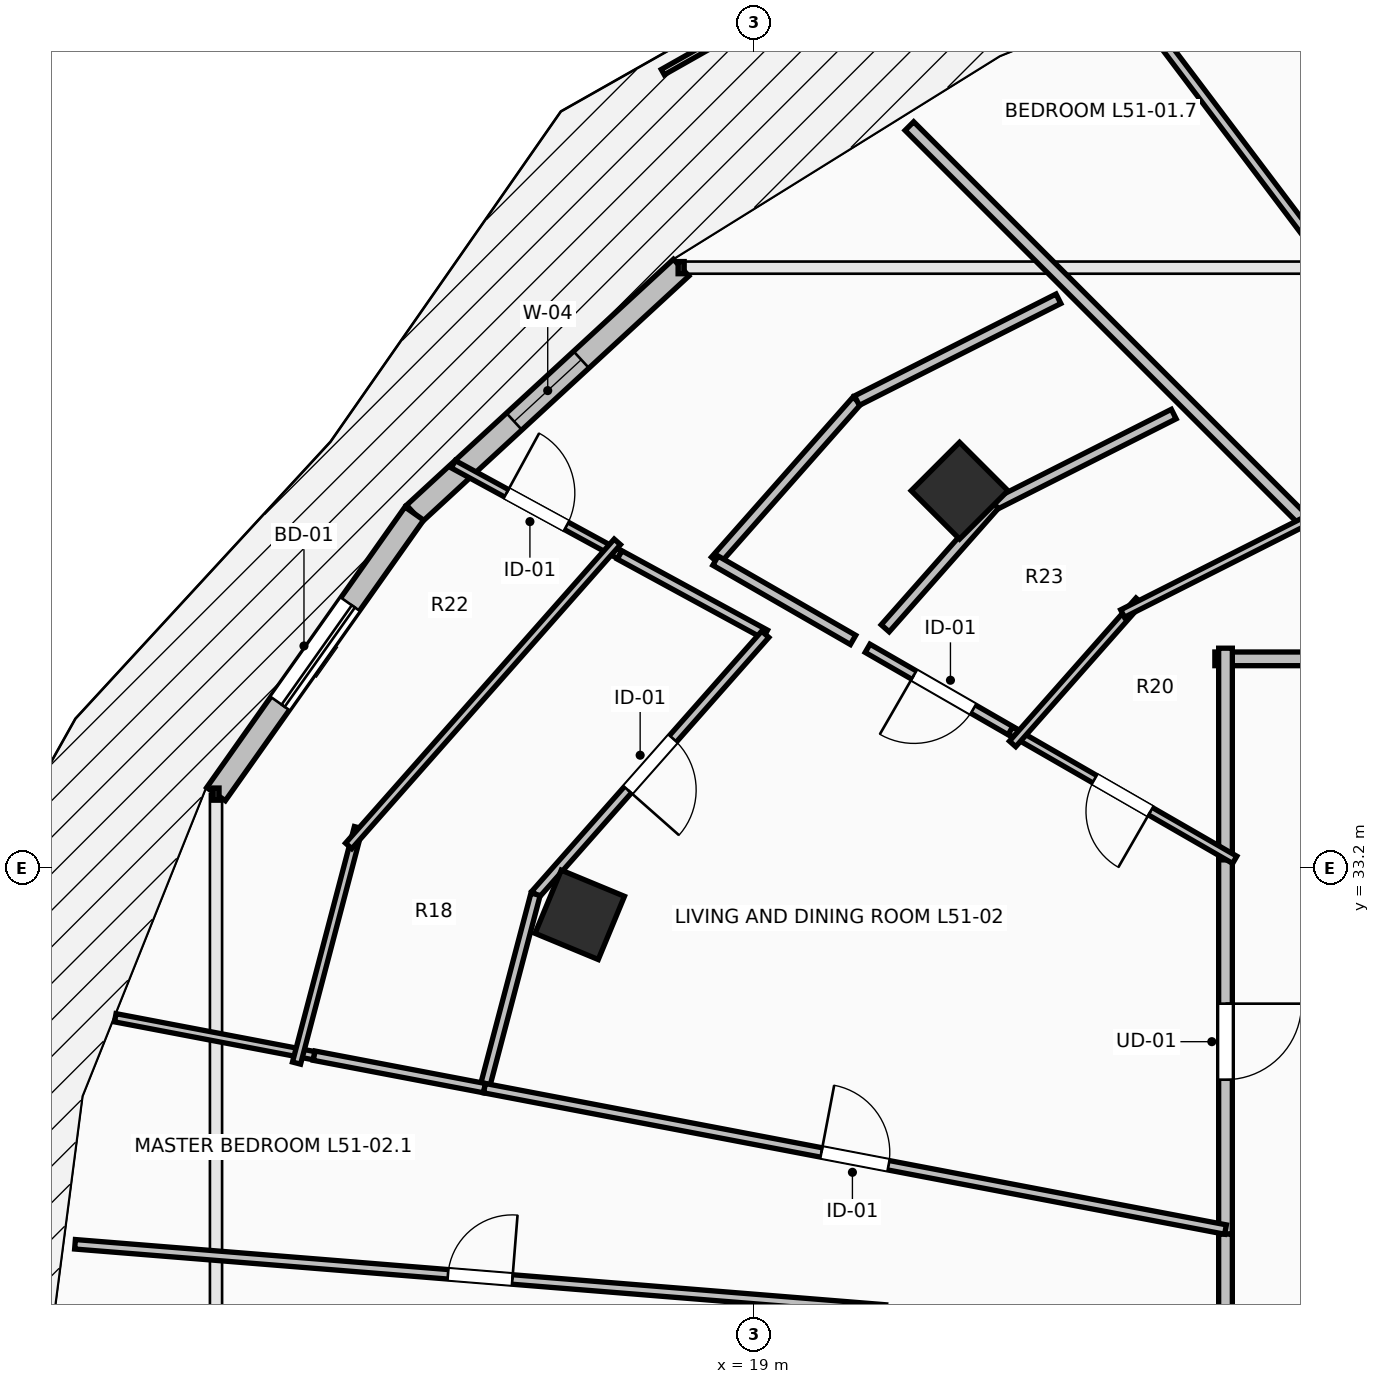
"""IFC4 building model, lengths in metres.
Left out: names, types, materials, properties, quantities, classifications, styles, units other than length and angle.
Written with IfcOpenShell. Run it as: python <this file> out.ifc"""

import sys

from ifc_helpers import new_model, si_unit, direction, frame, frame_2d, origin, origin_2d, place, context, subcontext, project, spatial, rectangle, extrude, element, fill, save


model = new_model("IFC4")
c1 = context("Model", 3, precision=1e-05, world=origin(), true_north=direction((0.0, 1.0)))
c2 = subcontext(c1, "Body", "Model", "MODEL_VIEW")
j1 = project(units=[si_unit("LENGTHUNIT", "METRE"), si_unit("PLANEANGLEUNIT", "RADIAN")], contexts=[c1])
p1 = place(None, origin())
s1 = spatial("IfcSite", under=j1, at=p1, CompositionType="ELEMENT")
p2 = place(p1, origin())
s2 = spatial("IfcBuilding", under=s1, at=p2, CompositionType="ELEMENT")
p3 = place(p2, frame((0.0, 0.0, 189.6)))
s3 = spatial("IfcBuildingStorey", under=s2, at=p3, CompositionType="ELEMENT", Elevation=189.6)
for number, where, z_axis, x_axis in (
    (1, (21.701, 38.162, 0.0), (0.0, 0.0, 1.0), (-0.707, 0.707, 0.0)),
    (2, (16.705, 32.582, 0.0), (0.0, 0.0, 1.0), (-0.924, 0.383, 0.0)),
):
    element("IfcColumn", number, at=place(p3, frame(where, z_axis=z_axis, x_axis=x_axis)), inside=s3, PredefinedType="COLUMN", context=c2, shape_type="SweptSolid", body=[
        extrude(rectangle(XDim=0.9, YDim=0.9, at=origin_2d()), origin(), (0.0, 0.0, 1.0), 3.5),
    ])
p4 = place(p3, frame((18.038, 41.097, 0.0), z_axis=(0.0, 0.0, 1.0), x_axis=(-0.735359993374, -0.677676678177, 0.0)))
e3 = element("IfcWall", 3, at=p4, inside=s3, PredefinedType="STANDARD", context=c2, shape_type="SweptSolid", body=[
    extrude(rectangle(XDim=4.774, YDim=0.3, at=frame_2d((2.387, 0.0))), origin(), (0.0, 0.0, 1.0), 3.24),
])
p5 = place(p4, frame((1.787, 0.0, 0.85)))
e4 = element("IfcOpeningElement", 4, at=p5, cuts=e3, PredefinedType="OPENING", context=c2, shape_type="SweptSolid", body=[
    extrude(rectangle(XDim=1.2, YDim=2.1, at=frame_2d((0.6, 1.05))), frame((0.0, 0.165, 0.0), z_axis=(0.0, -1.0, 0.0), x_axis=(1.0, 0.0, 0.0)), (0.0, 0.0, 1.0), 0.33),
])
p6 = place(p3, frame((14.528, 37.861, 0.0), z_axis=(0.0, 0.0, 1.0), x_axis=(-0.577168747264, -0.81662490605, 0.0)))
e5 = element("IfcWall", 5, at=p6, inside=s3, PredefinedType="STANDARD", context=c2, shape_type="SweptSolid", body=[
    extrude(rectangle(XDim=4.52, YDim=0.3, at=frame_2d((2.26, 0.0))), origin(), (0.0, 0.0, 1.0), 3.24),
])
p7 = place(p6, frame((1.46, 0.0, 0.0)))
e6 = element("IfcOpeningElement", 6, at=p7, cuts=e5, PredefinedType="OPENING", context=c2, shape_type="SweptSolid", body=[
    extrude(rectangle(XDim=1.6, YDim=2.3, at=frame_2d((0.8, 1.15))), frame((0.0, 0.165, 0.0), z_axis=(0.0, -1.0, 0.0), x_axis=(1.0, 0.0, 0.0)), (0.0, 0.0, 1.0), 0.33),
])
p8 = place(p3, frame((25.2, 33.445, 0.0), z_axis=(0.0, 0.0, 1.0), x_axis=(0.0, -1.0, 0.0)))
e7 = element("IfcWall", 7, at=p8, inside=s3, PredefinedType="PARTITIONING", context=c2, shape_type="SweptSolid", body=[
    extrude(rectangle(XDim=5.063, YDim=0.18, at=frame_2d((2.531, 0.0))), origin(), (0.0, 0.0, 1.0), 2.432),
])
p9 = place(p8, frame((2.031, 0.0, 0.0)))
e8 = element("IfcOpeningElement", 8, at=p9, cuts=e7, PredefinedType="OPENING", context=c2, shape_type="SweptSolid", body=[
    extrude(rectangle(XDim=1.0, YDim=2.15, at=frame_2d((0.5, 1.075))), frame((0.0, 0.105, 0.0), z_axis=(0.0, -1.0, 0.0), x_axis=(1.0, 0.0, 0.0)), (0.0, 0.0, 1.0), 0.21),
])
p10 = place(p3, frame((28.105, 35.95, 0.0), z_axis=(0.0, 0.0, 1.0), x_axis=(-1.0, 0.0, 0.0)))
e9 = element("IfcWall", 9, at=p10, inside=s3, PredefinedType="PARTITIONING", context=c2, shape_type="SweptSolid", body=[
    extrude(rectangle(XDim=3.045, YDim=0.18, at=frame_2d((1.522, 0.0))), origin(), (0.0, 0.0, 1.0), 2.432),
])
p11 = place(p3, frame((25.2, 36.09, 0.0), z_axis=(0.0, 0.0, 1.0), x_axis=(0.0, -1.0, 0.0)))
e10 = element("IfcWall", 10, at=p11, inside=s3, PredefinedType="PARTITIONING", context=c2, shape_type="SweptSolid", body=[
    extrude(rectangle(XDim=2.785, YDim=0.18, at=frame_2d((1.393, 0.0))), origin(), (0.0, 0.0, 1.0), 2.432),
])
p12 = place(p3, frame((25.2, 28.382, 0.0), z_axis=(0.0, 0.0, 1.0), x_axis=(0.0, -1.0, 0.0)))
e11 = element("IfcWall", 11, at=p12, inside=s3, PredefinedType="PARTITIONING", context=c2, shape_type="SweptSolid", body=[
    extrude(rectangle(XDim=1.132, YDim=0.18, at=frame_2d((0.566, 0.0))), origin(), (0.0, 0.0, 1.0), 2.432),
])
p13 = place(p3, frame((24.075, 44.46, 0.0), z_axis=(0.0, 0.0, 1.0), x_axis=(0.602185523072, -0.798356183544, 0.0)))
e12 = element("IfcWall", 12, at=p13, inside=s3, PredefinedType="PARTITIONING", context=c2, shape_type="SweptSolid", body=[
    extrude(rectangle(XDim=10.659, YDim=0.125, at=frame_2d((5.33, 0.0))), origin(), (0.0, 0.0, 1.0), 2.432),
])
p14 = place(p3, frame((21.041, 42.959, 0.0), z_axis=(0.0, 0.0, 1.0), x_axis=(0.707106781187, -0.707106781187, 0.0)))
e13 = element("IfcWall", 13, at=p14, inside=s3, PredefinedType="PARTITIONING", context=c2, shape_type="SweptSolid", body=[
    extrude(rectangle(XDim=9.912, YDim=0.16, at=frame_2d((4.956, 0.0))), origin(), (0.0, 0.0, 1.0), 2.432),
])
p15 = place(p3, frame((22.492, 34.936, 0.0), z_axis=(0.0, 0.0, 1.0), x_axis=(-0.866435390844, 0.499289208267, 0.0)))
e14 = element("IfcWall", 14, at=p15, inside=s3, PredefinedType="PARTITIONING", context=c2, shape_type="SweptSolid", body=[
    extrude(rectangle(XDim=2.309, YDim=0.125, at=frame_2d((1.155, 0.0))), origin(), (0.0, 0.0, 1.0), 2.922),
])
p16 = place(p15, frame((0.705, 0.0, 0.0)))
e15 = element("IfcOpeningElement", 15, at=p16, cuts=e14, PredefinedType="OPENING", context=c2, shape_type="SweptSolid", body=[
    extrude(rectangle(XDim=0.9, YDim=2.1, at=frame_2d((0.45, 1.05))), frame((0.0, 0.077, 0.0), z_axis=(0.0, -1.0, 0.0), x_axis=(1.0, 0.0, 0.0)), (0.0, 0.0, 1.0), 0.155),
])
p17 = place(p3, frame((25.321, 33.306, 0.0), z_axis=(0.0, 0.0, 1.0), x_axis=(-0.866517217622, 0.49914718427, 0.0)))
e16 = element("IfcWall", 16, at=p17, inside=s3, PredefinedType="PARTITIONING", context=c2, shape_type="SweptSolid", body=[
    extrude(rectangle(XDim=3.405, YDim=0.11, at=frame_2d((1.703, 0.0))), origin(), (0.0, 0.0, 1.0), 2.922),
])
p18 = place(p17, frame((1.278, 0.0, 0.0)))
e17 = element("IfcOpeningElement", 17, at=p18, cuts=e16, PredefinedType="OPENING", context=c2, shape_type="SweptSolid", body=[
    extrude(rectangle(XDim=0.85, YDim=2.1, at=frame_2d((0.425, 1.05))), frame((0.0, 0.07, 0.0), z_axis=(0.0, -1.0, 0.0), x_axis=(1.0, 0.0, 0.0)), (0.0, 0.0, 1.0), 0.14),
])
p19 = place(p3, frame((15.041, 38.51, 0.0), z_axis=(0.0, 0.0, 1.0), x_axis=(0.877951724479, -0.478749171784, 0.0)))
e18 = element("IfcWall", 18, at=p19, inside=s3, PredefinedType="PARTITIONING", context=c2, shape_type="SweptSolid", body=[
    extrude(rectangle(XDim=2.492, YDim=0.11, at=frame_2d((1.246, 0.0))), origin(), (0.0, 0.0, 1.0), 3.24),
])
p20 = place(p19, frame((0.796, 0.0, 0.0)))
e19 = element("IfcOpeningElement", 19, at=p20, cuts=e18, PredefinedType="OPENING", context=c2, shape_type="SweptSolid", body=[
    extrude(rectangle(XDim=0.9, YDim=2.1, at=frame_2d((0.45, 1.05))), frame((0.0, 0.07, 0.0), z_axis=(0.0, -1.0, 0.0), x_axis=(1.0, 0.0, 0.0)), (0.0, 0.0, 1.0), 0.14),
])
p21 = place(p3, frame((13.21, 30.729, 0.0), z_axis=(0.0, 0.0, 1.0), x_axis=(-0.982266305937, 0.187491077708, 0.0)))
e20 = element("IfcWall", 20, at=p21, inside=s3, PredefinedType="PARTITIONING", context=c2, shape_type="SweptSolid", body=[
    extrude(rectangle(XDim=2.664, YDim=0.11, at=frame_2d((1.332, 0.0))), origin(), (0.0, 0.0, 1.0), 3.24),
])
p22 = place(p3, frame((17.229, 37.317, 0.0), z_axis=(0.0, 0.0, 1.0), x_axis=(0.878117834212, -0.47844442649, 0.0)))
e21 = element("IfcWall", 21, at=p22, inside=s3, PredefinedType="PARTITIONING", context=c2, shape_type="SweptSolid", body=[
    extrude(rectangle(XDim=2.182, YDim=0.125, at=frame_2d((1.091, 0.0))), origin(), (0.0, 0.0, 1.0), 3.24),
])
p23 = place(p3, frame((19.145, 36.273, 0.0), z_axis=(0.0, 0.0, 1.0), x_axis=(-0.662162868769, -0.749359950373, 0.0)))
e22 = element("IfcWall", 22, at=p23, inside=s3, PredefinedType="PARTITIONING", context=c2, shape_type="SweptSolid", body=[
    extrude(rectangle(XDim=4.564, YDim=0.125, at=frame_2d((2.282, 0.0))), origin(), (0.0, 0.0, 1.0), 3.24),
])
p24 = place(p23, frame((1.832, 0.0, 0.0)))
e23 = element("IfcOpeningElement", 23, at=p24, cuts=e22, PredefinedType="OPENING", context=c2, shape_type="SweptSolid", body=[
    extrude(rectangle(XDim=0.9, YDim=2.1, at=frame_2d((0.45, 1.05))), frame((0.0, 0.077, 0.0), z_axis=(0.0, -1.0, 0.0), x_axis=(1.0, 0.0, 0.0)), (0.0, 0.0, 1.0), 0.155),
])
p25 = place(p3, frame((16.123, 32.853, 0.0), z_axis=(0.0, 0.0, 1.0), x_axis=(-0.254775717765, -0.967000172512, 0.0)))
e24 = element("IfcWall", 24, at=p25, inside=s3, PredefinedType="PARTITIONING", context=c2, shape_type="SweptSolid", body=[
    extrude(rectangle(XDim=2.638, YDim=0.125, at=frame_2d((1.319, 0.0))), origin(), (0.0, 0.0, 1.0), 3.24),
])
p26 = place(p3, frame((15.451, 30.302, 0.0), z_axis=(0.0, 0.0, 1.0), x_axis=(-0.982295439063, 0.187338384738, 0.0)))
e25 = element("IfcWall", 25, at=p26, inside=s3, PredefinedType="PARTITIONING", context=c2, shape_type="SweptSolid", body=[
    extrude(rectangle(XDim=2.281, YDim=0.125, at=frame_2d((1.14, 0.0))), origin(), (0.0, 0.0, 1.0), 3.24),
])
p27 = place(p3, frame((15.451, 30.302, 0.0), z_axis=(0.0, 0.0, 1.0), x_axis=(0.982284698783, -0.187394691859, 0.0)))
e26 = element("IfcWall", 26, at=p27, inside=s3, PredefinedType="PARTITIONING", context=c2, shape_type="SweptSolid", body=[
    extrude(rectangle(XDim=9.925, YDim=0.125, at=frame_2d((4.962, 0.0))), origin(), (0.0, 0.0, 1.0), 2.774),
])
p28 = place(p27, frame((4.512, 0.0, 0.0)))
e27 = element("IfcOpeningElement", 27, at=p28, cuts=e26, PredefinedType="OPENING", context=c2, shape_type="SweptSolid", body=[
    extrude(rectangle(XDim=0.9, YDim=2.1, at=frame_2d((0.45, 1.05))), frame((0.0, 0.077, 0.0), z_axis=(0.0, -1.0, 0.0), x_axis=(1.0, 0.0, 0.0)), (0.0, 0.0, 1.0), 0.155),
])
p29 = place(p3, frame((22.399, 34.831, 0.0), z_axis=(0.0, 0.0, 1.0), x_axis=(0.662292938072, 0.749244996099, 0.0)))
e28 = element("IfcWall", 28, at=p29, inside=s3, PredefinedType="PARTITIONING", context=c2, shape_type="SweptSolid", body=[
    extrude(rectangle(XDim=2.513, YDim=0.11, at=frame_2d((1.256, 0.0))), origin(), (0.0, 0.0, 1.0), 2.432),
])
p30 = place(p3, frame((23.846, 36.546, 0.0), z_axis=(0.0, 0.0, 1.0), x_axis=(0.892553076465, 0.450942352959, 0.0)))
e29 = element("IfcWall", 29, at=p30, inside=s3, PredefinedType="PARTITIONING", context=c2, shape_type="SweptSolid", body=[
    extrude(rectangle(XDim=2.826, YDim=0.11, at=frame_2d((1.413, 0.0))), origin(), (0.0, 0.0, 1.0), 2.432),
])
p31 = place(p3, frame((12.979, 30.632, 0.0), z_axis=(0.0, 0.0, 1.0), x_axis=(0.254121849718, 0.967172210879, 0.0)))
e30 = element("IfcWall", 30, at=p31, inside=s3, PredefinedType="PARTITIONING", context=c2, shape_type="SweptSolid", body=[
    extrude(rectangle(XDim=3.203, YDim=0.11, at=frame_2d((1.602, 0.0))), origin(), (0.0, 0.0, 1.0), 3.24),
])
p32 = place(p3, frame((13.664, 33.489, 0.0), z_axis=(0.0, 0.0, 1.0), x_axis=(0.662149418065, 0.74937183571, 0.0)))
e31 = element("IfcWall", 31, at=p32, inside=s3, PredefinedType="PARTITIONING", context=c2, shape_type="SweptSolid", body=[
    extrude(rectangle(XDim=5.338, YDim=0.11, at=frame_2d((2.669, 0.0))), origin(), (0.0, 0.0, 1.0), 3.24),
])
p33 = place(p3, frame((10.064, 28.248, 0.0), z_axis=(0.0, 0.0, 1.0), x_axis=(0.996775744362, -0.080237867939, 0.0)))
e32 = element("IfcWall", 32, at=p33, inside=s3, PredefinedType="PARTITIONING", context=c2, shape_type="SweptSolid", body=[
    extrude(rectangle(XDim=10.695, YDim=0.125, at=frame_2d((5.348, 0.0))), origin(), (0.0, 0.0, 1.0), 2.774),
])
p34 = place(p33, frame((4.923, 0.0, 0.0)))
e33 = element("IfcOpeningElement", 33, at=p34, cuts=e32, PredefinedType="OPENING", context=c2, shape_type="SweptSolid", body=[
    extrude(rectangle(XDim=0.85, YDim=2.1, at=frame_2d((0.425, 1.05))), frame((0.0, 0.077, 0.0), z_axis=(0.0, -1.0, 0.0), x_axis=(1.0, 0.0, 0.0)), (0.0, 0.0, 1.0), 0.155),
])
p35 = place(p3, frame((18.49, 37.242, 0.0), z_axis=(0.0, 0.0, 1.0), x_axis=(0.662371376331, 0.749175653513, 0.0)))
e34 = element("IfcWall", 34, at=p35, inside=s3, PredefinedType="PARTITIONING", context=c2, shape_type="SweptSolid", body=[
    extrude(rectangle(XDim=2.81, YDim=0.14, at=frame_2d((1.405, 0.0))), origin(), (0.0, 0.0, 1.0), 3.24),
])
p36 = place(p3, frame((20.351, 39.347, 0.0), z_axis=(0.0, 0.0, 1.0), x_axis=(0.89244587056, 0.451154483653, 0.0)))
e35 = element("IfcWall", 35, at=p36, inside=s3, PredefinedType="PARTITIONING", context=c2, shape_type="SweptSolid", body=[
    extrude(rectangle(XDim=2.97, YDim=0.14, at=frame_2d((1.485, 0.0))), origin(), (0.0, 0.0, 1.0), 3.24),
])
p37 = place(p3, frame((20.3, 36.199, 0.0), z_axis=(0.0, 0.0, 1.0), x_axis=(-0.86645395742, 0.499256987604, 0.0)))
e36 = element("IfcWall", 36, at=p37, inside=s3, PredefinedType="PARTITIONING", context=c2, shape_type="SweptSolid", body=[
    extrude(rectangle(XDim=2.089, YDim=0.14, at=frame_2d((1.044, 0.0))), origin(), (0.0, 0.0, 1.0), 2.774),
])
p38 = place(p3, frame((24.519, 39.17, 0.0), z_axis=(0.0, 0.0, 1.0), x_axis=(-0.89247840077, -0.451090128643, 0.0)))
e37 = element("IfcWall", 37, at=p38, inside=s3, PredefinedType="PARTITIONING", context=c2, shape_type="SweptSolid", body=[
    extrude(rectangle(XDim=2.642, YDim=0.14, at=frame_2d((1.321, 0.0))), origin(), (0.0, 0.0, 1.0), 2.432),
])
p39 = place(p3, frame((22.161, 37.978, 0.0), z_axis=(0.0, 0.0, 1.0), x_axis=(-0.662476802918, -0.749082429106, 0.0)))
e38 = element("IfcWall", 38, at=p39, inside=s3, PredefinedType="PARTITIONING", context=c2, shape_type="SweptSolid", body=[
    extrude(rectangle(XDim=2.171, YDim=0.14, at=frame_2d((1.085, 0.0))), origin(), (0.0, 0.0, 1.0), 2.432),
])
p40 = place(p7, origin())
e39 = element("IfcDoor", 39, at=p40, inside=s3, OperationType="SLIDING_TO_LEFT", PredefinedType="DOOR", context=c2, shape_type="SweptSolid", body=[
    extrude(rectangle(XDim=1.6, YDim=2.3, at=frame_2d((0.8, 1.15))), frame((0.0, 0.025, 0.0), z_axis=(0.0, -1.0, 0.0), x_axis=(1.0, 0.0, 0.0)), (0.0, 0.0, 1.0), 0.05),
])
fill(e6, e39)
p41 = place(p5, origin())
e40 = element("IfcWindow", 40, at=p41, inside=s3, PartitioningType="SINGLE_PANEL", PredefinedType="WINDOW", context=c2, shape_type="SweptSolid", body=[
    extrude(rectangle(XDim=1.2, YDim=2.1, at=frame_2d((0.6, 1.05))), frame((0.0, 0.03, 0.0), z_axis=(0.0, -1.0, 0.0), x_axis=(1.0, 0.0, 0.0)), (0.0, 0.0, 1.0), 0.06),
])
fill(e4, e40)
p42 = place(p9, origin())
e41 = element("IfcDoor", 41, at=p42, inside=s3, OperationType="SINGLE_SWING_LEFT", PredefinedType="DOOR", context=c2, shape_type="SweptSolid", body=[
    extrude(rectangle(XDim=1.0, YDim=2.15, at=frame_2d((0.5, 1.075))), frame((0.0, 0.025, 0.0), z_axis=(0.0, -1.0, 0.0), x_axis=(1.0, 0.0, 0.0)), (0.0, 0.0, 1.0), 0.05),
])
fill(e8, e41)
p43 = place(p16, origin())
e42 = element("IfcDoor", 42, at=p43, inside=s3, OperationType="SINGLE_SWING_RIGHT", PredefinedType="DOOR", context=c2, shape_type="SweptSolid", body=[
    extrude(rectangle(XDim=0.9, YDim=2.1, at=frame_2d((0.45, 1.05))), frame((0.0, 0.025, 0.0), z_axis=(0.0, -1.0, 0.0), x_axis=(1.0, 0.0, 0.0)), (0.0, 0.0, 1.0), 0.05),
])
fill(e15, e42)
p44 = place(p18, origin())
e43 = element("IfcDoor", 43, at=p44, inside=s3, OperationType="SINGLE_SWING_LEFT", PredefinedType="DOOR", context=c2, shape_type="SweptSolid", body=[
    extrude(rectangle(XDim=0.85, YDim=2.1, at=frame_2d((0.425, 1.05))), frame((0.0, 0.025, 0.0), z_axis=(0.0, -1.0, 0.0), x_axis=(1.0, 0.0, 0.0)), (0.0, 0.0, 1.0), 0.05),
])
fill(e17, e43)
p45 = place(p20, origin())
e44 = element("IfcDoor", 44, at=p45, inside=s3, OperationType="SINGLE_SWING_LEFT", PredefinedType="DOOR", context=c2, shape_type="SweptSolid", body=[
    extrude(rectangle(XDim=0.9, YDim=2.1, at=frame_2d((0.45, 1.05))), frame((0.0, 0.025, 0.0), z_axis=(0.0, -1.0, 0.0), x_axis=(1.0, 0.0, 0.0)), (0.0, 0.0, 1.0), 0.05),
])
fill(e19, e44)
p46 = place(p24, origin())
e45 = element("IfcDoor", 45, at=p46, inside=s3, OperationType="SINGLE_SWING_RIGHT", PredefinedType="DOOR", context=c2, shape_type="SweptSolid", body=[
    extrude(rectangle(XDim=0.9, YDim=2.1, at=frame_2d((0.45, 1.05))), frame((0.0, 0.025, 0.0), z_axis=(0.0, -1.0, 0.0), x_axis=(1.0, 0.0, 0.0)), (0.0, 0.0, 1.0), 0.05),
])
fill(e23, e45)
p47 = place(p28, origin())
e46 = element("IfcDoor", 46, at=p47, inside=s3, OperationType="SINGLE_SWING_LEFT", PredefinedType="DOOR", context=c2, shape_type="SweptSolid", body=[
    extrude(rectangle(XDim=0.9, YDim=2.1, at=frame_2d((0.45, 1.05))), frame((0.0, 0.025, 0.0), z_axis=(0.0, -1.0, 0.0), x_axis=(1.0, 0.0, 0.0)), (0.0, 0.0, 1.0), 0.05),
])
fill(e27, e46)
p48 = place(p34, origin())
e47 = element("IfcDoor", 47, at=p48, inside=s3, OperationType="SINGLE_SWING_RIGHT", PredefinedType="DOOR", context=c2, shape_type="SweptSolid", body=[
    extrude(rectangle(XDim=0.85, YDim=2.1, at=frame_2d((0.425, 1.05))), frame((0.0, 0.025, 0.0), z_axis=(0.0, -1.0, 0.0), x_axis=(1.0, 0.0, 0.0)), (0.0, 0.0, 1.0), 0.05),
])
fill(e33, e47)
save(model, sys.argv[1])
